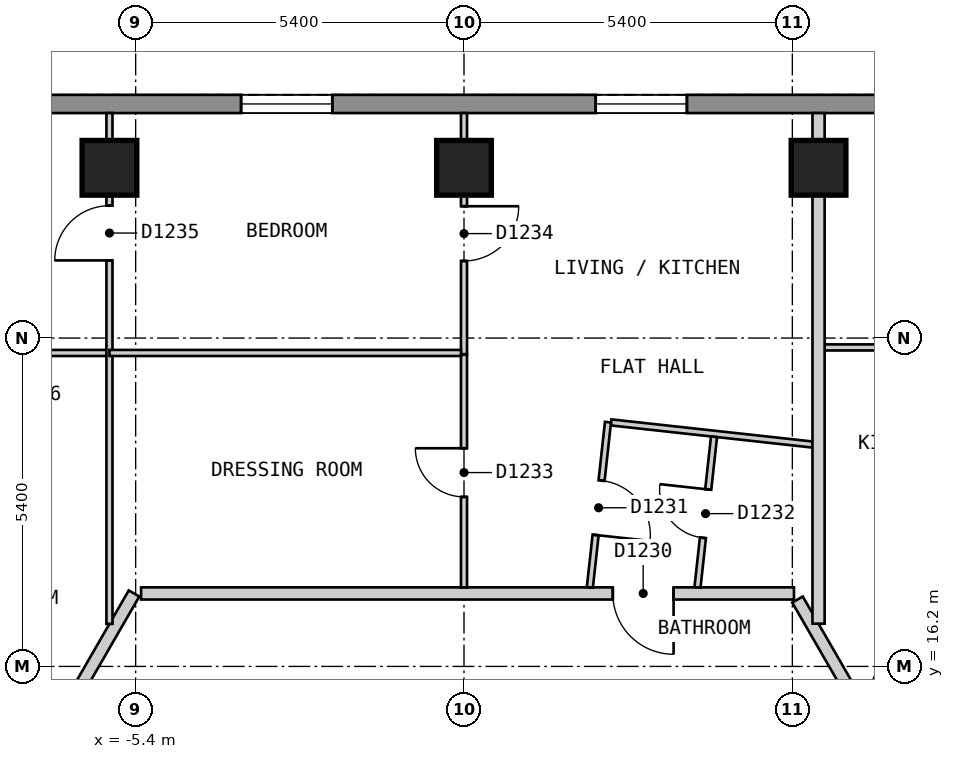
"""IFC4 building model, lengths in metres.
Left out: names, types, materials, properties, quantities, classifications, styles, units other than length and angle.
Written with IfcOpenShell. Run it as: python <this file> out.ifc"""

import sys

from ifc_helpers import new_model, si_unit, direction, frame, frame_2d, origin, origin_2d, place, context, subcontext, project, spatial, polyline, rectangle, outline, extrude, element, fill, save


model = new_model("IFC4")
c1 = context("Model", 3, precision=1e-05, world=origin(), true_north=direction((0.0, 1.0)))
c2 = subcontext(c1, "Body", "Model", "MODEL_VIEW")
j1 = project(units=[si_unit("LENGTHUNIT", "METRE"), si_unit("PLANEANGLEUNIT", "RADIAN")], contexts=[c1])
p1 = place(None, origin())
s1 = spatial("IfcSite", under=j1, at=p1, CompositionType="ELEMENT")
p2 = place(p1, origin())
s2 = spatial("IfcBuilding", under=s1, at=p2, CompositionType="ELEMENT")
p3 = place(p2, frame((0.0, 0.0, 117.6)))
s3 = spatial("IfcBuildingStorey", under=s2, at=p3, CompositionType="ELEMENT", Elevation=117.6)
for number, where, z_axis, x_axis in (
    (1, (5.831, 24.4, 0.0), (0.0, 0.0, 1.0), (-1.0, 0.0, 0.0)),
    (2, (0.0, 24.4, 0.0), (0.0, 0.0, 1.0), (-1.0, 0.0, 0.0)),
    (3, (-5.831, 24.4, 0.0), (0.0, 0.0, 1.0), (-1.0, 0.0, 0.0)),
):
    element("IfcColumn", number, at=place(p3, frame(where, z_axis=z_axis, x_axis=x_axis)), inside=s3, PredefinedType="COLUMN", context=c2, shape_type="SweptSolid", body=[
        extrude(rectangle(XDim=0.9, YDim=0.9, at=origin_2d()), origin(), (0.0, 0.0, 1.0), 3.0),
    ])
p4 = place(p3, frame((12.355, 25.45, 0.0), z_axis=(0.0, 0.0, 1.0), x_axis=(-1.0, 0.0, 0.0)))
e4 = element("IfcWall", 4, at=p4, inside=s3, PredefinedType="SOLIDWALL", context=c2, shape_type="SweptSolid", body=[
    extrude(outline(polyline([(0.0, -0.15), (24.71, -0.15), (24.63, 0.15), (0.08, 0.15), (0.0, -0.15)])), origin(), (0.0, 0.0, 1.0), 2.7),
])
p5 = place(p4, frame((2.858, 0.0, 0.15)))
e5 = element("IfcOpeningElement", 5, at=p5, cuts=e4, PredefinedType="OPENING", context=c2, shape_type="SweptSolid", body=[
    extrude(rectangle(XDim=1.5, YDim=2.1, at=frame_2d((0.75, 1.05))), frame((0.0, 0.16, 0.0), z_axis=(0.0, -1.0, 0.0), x_axis=(1.0, 0.0, 0.0)), (0.0, 0.0, 1.0), 0.32),
])
p6 = place(p4, frame((8.689, 0.0, 0.15)))
e6 = element("IfcOpeningElement", 6, at=p6, cuts=e4, PredefinedType="OPENING", context=c2, shape_type="SweptSolid", body=[
    extrude(rectangle(XDim=1.5, YDim=2.1, at=frame_2d((0.75, 1.05))), frame((0.0, 0.16, 0.0), z_axis=(0.0, -1.0, 0.0), x_axis=(1.0, 0.0, 0.0)), (0.0, 0.0, 1.0), 0.32),
])
p7 = place(p4, frame((14.521, 0.0, 0.15)))
e7 = element("IfcOpeningElement", 7, at=p7, cuts=e4, PredefinedType="OPENING", context=c2, shape_type="SweptSolid", body=[
    extrude(rectangle(XDim=1.5, YDim=2.1, at=frame_2d((0.75, 1.05))), frame((0.0, 0.16, 0.0), z_axis=(0.0, -1.0, 0.0), x_axis=(1.0, 0.0, 0.0)), (0.0, 0.0, 1.0), 0.32),
])
p8 = place(p4, frame((20.352, 0.0, 0.15)))
e8 = element("IfcOpeningElement", 8, at=p8, cuts=e4, PredefinedType="OPENING", context=c2, shape_type="SweptSolid", body=[
    extrude(rectangle(XDim=1.5, YDim=2.1, at=frame_2d((0.75, 1.05))), frame((0.0, 0.16, 0.0), z_axis=(0.0, -1.0, 0.0), x_axis=(1.0, 0.0, 0.0)), (0.0, 0.0, 1.0), 0.32),
])
p9 = place(p3, frame((5.485, 17.3, 0.0), z_axis=(0.0, 0.0, 1.0), x_axis=(0.500027479704, -0.866009537788, 0.0)))
e9 = element("IfcWall", 9, at=p9, inside=s3, PredefinedType="PARTITIONING", context=c2, shape_type="SweptSolid", body=[
    extrude(rectangle(XDim=2.309, YDim=0.2, at=frame_2d((1.155, 0.0))), origin(), (0.0, 0.0, 1.0), 2.7),
])
p10 = place(p3, frame((-5.311, 17.4, 0.0), z_axis=(0.0, 0.0, 1.0), x_axis=(1.0, 0.0, 0.0)))
e10 = element("IfcWall", 10, at=p10, inside=s3, PredefinedType="PARTITIONING", context=c2, shape_type="SweptSolid", body=[
    extrude(rectangle(XDim=10.738, YDim=0.2, at=frame_2d((5.369, 0.0))), origin(), (0.0, 0.0, 1.0), 2.7),
])
p11 = place(p10, frame((7.758, 0.0, 0.0)))
e11 = element("IfcOpeningElement", 11, at=p11, cuts=e10, PredefinedType="OPENING", context=c2, shape_type="SweptSolid", body=[
    extrude(rectangle(XDim=1.0, YDim=2.1, at=frame_2d((0.5, 1.05))), frame((0.0, 0.11, 0.0), z_axis=(0.0, -1.0, 0.0), x_axis=(1.0, 0.0, 0.0)), (0.0, 0.0, 1.0), 0.22),
])
p12 = place(p3, frame((-6.697, 15.2, 0.0), z_axis=(0.0, 0.0, 1.0), x_axis=(0.499963722229, 0.866046347752, 0.0)))
e12 = element("IfcWall", 12, at=p12, inside=s3, PredefinedType="PARTITIONING", context=c2, shape_type="SweptSolid", body=[
    extrude(rectangle(XDim=2.54, YDim=0.2, at=frame_2d((1.27, 0.0))), origin(), (0.0, 0.0, 1.0), 2.7),
])
p13 = place(p3, frame((2.419, 20.213, 0.0), z_axis=(0.0, 0.0, 1.0), x_axis=(0.994022340378, -0.109176860325, 0.0)))
e13 = element("IfcWall", 13, at=p13, inside=s3, PredefinedType="PARTITIONING", context=c2, shape_type="SweptSolid", body=[
    extrude(rectangle(XDim=3.332, YDim=0.1, at=frame_2d((1.666, 0.0))), origin(), (0.0, 0.0, 1.0), 2.7),
])
p14 = place(p3, frame((0.0, 21.325, 0.0), z_axis=(0.0, 0.0, 1.0), x_axis=(0.0, -1.0, 0.0)))
e14 = element("IfcWall", 14, at=p14, inside=s3, PredefinedType="PARTITIONING", context=c2, shape_type="SweptSolid", body=[
    extrude(rectangle(XDim=3.825, YDim=0.1, at=frame_2d((1.913, 0.0))), origin(), (0.0, 0.0, 1.0), 2.7),
])
p15 = place(p14, frame((1.537, 0.0, 0.0)))
e15 = element("IfcOpeningElement", 15, at=p15, cuts=e14, PredefinedType="OPENING", context=c2, shape_type="SweptSolid", body=[
    extrude(rectangle(XDim=0.8, YDim=2.1, at=frame_2d((0.4, 1.05))), frame((0.0, 0.06, 0.0), z_axis=(0.0, -1.0, 0.0), x_axis=(1.0, 0.0, 0.0)), (0.0, 0.0, 1.0), 0.12),
])
p16 = place(p3, frame((-7.652, 21.355, 0.0), z_axis=(0.0, 0.0, 1.0), x_axis=(1.0, 0.0, 0.0)))
e16 = element("IfcWall", 16, at=p16, inside=s3, PredefinedType="PARTITIONING", context=c2, shape_type="SweptSolid", body=[
    extrude(rectangle(XDim=1.821, YDim=0.1, at=frame_2d((0.911, 0.0))), origin(), (0.0, 0.0, 1.0), 2.7),
])
p17 = place(p3, frame((5.931, 21.446, 0.0), z_axis=(0.0, 0.0, 1.0), x_axis=(1.0, 0.0, 0.0)))
e17 = element("IfcWall", 17, at=p17, inside=s3, PredefinedType="PARTITIONING", context=c2, shape_type="SweptSolid", body=[
    extrude(rectangle(XDim=1.832, YDim=0.1, at=frame_2d((0.916, 0.0))), origin(), (0.0, 0.0, 1.0), 2.7),
])
p18 = place(p3, frame((6.6, 15.569, 0.0), z_axis=(0.0, 0.0, 1.0), x_axis=(0.415221636251, 0.909720282718, 0.0)))
e18 = element("IfcWall", 18, at=p18, inside=s3, PredefinedType="PARTITIONING", context=c2, shape_type="SweptSolid", body=[
    extrude(rectangle(XDim=4.783, YDim=0.1, at=frame_2d((2.391, 0.0))), origin(), (0.0, 0.0, 1.0), 2.7),
])
p19 = place(p18, frame((1.911, 0.0, 0.0)))
e19 = element("IfcOpeningElement", 19, at=p19, cuts=e18, PredefinedType="OPENING", context=c2, shape_type="SweptSolid", body=[
    extrude(rectangle(XDim=0.9, YDim=2.1, at=frame_2d((0.45, 1.05))), frame((0.0, 0.06, 0.0), z_axis=(0.0, -1.0, 0.0), x_axis=(1.0, 0.0, 0.0)), (0.0, 0.0, 1.0), 0.12),
])
p20 = place(p3, frame((2.07, 17.5, 0.0), z_axis=(0.0, 0.0, 1.0), x_axis=(0.108970694085, 0.994044962681, 0.0)))
e20 = element("IfcWall", 20, at=p20, inside=s3, PredefinedType="PARTITIONING", context=c2, shape_type="SweptSolid", body=[
    extrude(rectangle(XDim=2.733, YDim=0.1, at=frame_2d((1.367, 0.0))), origin(), (0.0, 0.0, 1.0), 2.7),
])
p21 = place(p20, frame((0.867, 0.0, 0.0)))
e21 = element("IfcOpeningElement", 21, at=p21, cuts=e20, PredefinedType="OPENING", context=c2, shape_type="SweptSolid", body=[
    extrude(rectangle(XDim=0.9, YDim=2.1, at=frame_2d((0.45, 1.05))), frame((0.0, 0.06, 0.0), z_axis=(0.0, -1.0, 0.0), x_axis=(1.0, 0.0, 0.0)), (0.0, 0.0, 1.0), 0.12),
])
p22 = place(p3, frame((3.84, 17.5, 0.0), z_axis=(0.0, 0.0, 1.0), x_axis=(0.109141067014, 0.994026271027, 0.0)))
e22 = element("IfcWall", 22, at=p22, inside=s3, PredefinedType="PARTITIONING", context=c2, shape_type="SweptSolid", body=[
    extrude(rectangle(XDim=2.492, YDim=0.1, at=frame_2d((1.246, 0.0))), origin(), (0.0, 0.0, 1.0), 2.7),
])
p23 = place(p22, frame((0.82, 0.0, 0.0)))
e23 = element("IfcOpeningElement", 23, at=p23, cuts=e22, PredefinedType="OPENING", context=c2, shape_type="SweptSolid", body=[
    extrude(rectangle(XDim=0.8, YDim=2.1, at=frame_2d((0.4, 1.05))), frame((0.0, 0.06, 0.0), z_axis=(0.0, -1.0, 0.0), x_axis=(1.0, 0.0, 0.0)), (0.0, 0.0, 1.0), 0.12),
])
p24 = place(p3, frame((0.0, 21.335, 0.0), z_axis=(0.0, 0.0, 1.0), x_axis=(0.0, 1.0, 0.0)))
e24 = element("IfcWall", 24, at=p24, inside=s3, PredefinedType="PARTITIONING", context=c2, shape_type="SweptSolid", body=[
    extrude(rectangle(XDim=3.965, YDim=0.1, at=frame_2d((1.982, 0.0))), origin(), (0.0, 0.0, 1.0), 2.7),
])
p25 = place(p24, frame((1.533, 0.0, 0.0)))
e25 = element("IfcOpeningElement", 25, at=p25, cuts=e24, PredefinedType="OPENING", context=c2, shape_type="SweptSolid", body=[
    extrude(rectangle(XDim=0.9, YDim=2.1, at=frame_2d((0.45, 1.05))), frame((0.0, 0.06, 0.0), z_axis=(0.0, -1.0, 0.0), x_axis=(1.0, 0.0, 0.0)), (0.0, 0.0, 1.0), 0.12),
])
p26 = place(p3, frame((-5.831, 16.9, 0.0), z_axis=(0.0, 0.0, 1.0), x_axis=(0.0, 1.0, 0.0)))
e26 = element("IfcWall", 26, at=p26, inside=s3, PredefinedType="PARTITIONING", context=c2, shape_type="SweptSolid", body=[
    extrude(rectangle(XDim=8.4, YDim=0.1, at=frame_2d((4.2, 0.0))), origin(), (0.0, 0.0, 1.0), 2.7),
])
p27 = place(p26, frame((5.977, 0.0, 0.0)))
e27 = element("IfcOpeningElement", 27, at=p27, cuts=e26, PredefinedType="OPENING", context=c2, shape_type="SweptSolid", body=[
    extrude(rectangle(XDim=0.9, YDim=2.1, at=frame_2d((0.45, 1.05))), frame((0.0, 0.06, 0.0), z_axis=(0.0, -1.0, 0.0), x_axis=(1.0, 0.0, 0.0)), (0.0, 0.0, 1.0), 0.12),
])
p28 = place(p3, frame((5.831, 16.903, 0.0), z_axis=(0.0, 0.0, 1.0), x_axis=(0.0, 1.0, 0.0)))
e28 = element("IfcWall", 28, at=p28, inside=s3, PredefinedType="PARTITIONING", context=c2, shape_type="SweptSolid", body=[
    extrude(rectangle(XDim=8.397, YDim=0.2, at=frame_2d((4.198, 0.0))), origin(), (0.0, 0.0, 1.0), 2.7),
])
p29 = place(p3, frame((-5.831, 21.355, 0.0), z_axis=(0.0, 0.0, 1.0), x_axis=(1.0, 0.0, 0.0)))
e29 = element("IfcWall", 29, at=p29, inside=s3, PredefinedType="PARTITIONING", context=c2, shape_type="SweptSolid", body=[
    extrude(rectangle(XDim=5.781, YDim=0.1, at=frame_2d((2.891, 0.0))), origin(), (0.0, 0.0, 1.0), 2.7),
])
p30 = place(p6, origin())
e30 = element("IfcWindow", 30, at=p30, inside=s3, PartitioningType="SINGLE_PANEL", PredefinedType="WINDOW", context=c2, shape_type="SweptSolid", body=[
    extrude(rectangle(XDim=1.5, YDim=2.1, at=frame_2d((0.75, 1.05))), frame((0.0, 0.03, 0.0), z_axis=(0.0, -1.0, 0.0), x_axis=(1.0, 0.0, 0.0)), (0.0, 0.0, 1.0), 0.06),
])
fill(e6, e30)
p31 = place(p7, origin())
e31 = element("IfcWindow", 31, at=p31, inside=s3, PartitioningType="SINGLE_PANEL", PredefinedType="WINDOW", context=c2, shape_type="SweptSolid", body=[
    extrude(rectangle(XDim=1.5, YDim=2.1, at=frame_2d((0.75, 1.05))), frame((0.0, 0.03, 0.0), z_axis=(0.0, -1.0, 0.0), x_axis=(1.0, 0.0, 0.0)), (0.0, 0.0, 1.0), 0.06),
])
fill(e7, e31)
p32 = place(p11, origin())
e32 = element("IfcDoor", 32, at=p32, inside=s3, OperationType="SINGLE_SWING_RIGHT", PredefinedType="DOOR", context=c2, shape_type="SweptSolid", body=[
    extrude(rectangle(XDim=1.0, YDim=2.1, at=frame_2d((0.5, 1.05))), frame((0.0, 0.025, 0.0), z_axis=(0.0, -1.0, 0.0), x_axis=(1.0, 0.0, 0.0)), (0.0, 0.0, 1.0), 0.05),
])
fill(e11, e32)
p33 = place(p21, origin())
e33 = element("IfcDoor", 33, at=p33, inside=s3, OperationType="SINGLE_SWING_LEFT", PredefinedType="DOOR", context=c2, shape_type="SweptSolid", body=[
    extrude(rectangle(XDim=0.9, YDim=2.1, at=frame_2d((0.45, 1.05))), frame((0.0, 0.025, 0.0), z_axis=(0.0, -1.0, 0.0), x_axis=(1.0, 0.0, 0.0)), (0.0, 0.0, 1.0), 0.05),
])
fill(e21, e33)
p34 = place(p23, origin())
e34 = element("IfcDoor", 34, at=p34, inside=s3, OperationType="SINGLE_SWING_RIGHT", PredefinedType="DOOR", context=c2, shape_type="SweptSolid", body=[
    extrude(rectangle(XDim=0.8, YDim=2.1, at=frame_2d((0.4, 1.05))), frame((0.0, 0.025, 0.0), z_axis=(0.0, -1.0, 0.0), x_axis=(1.0, 0.0, 0.0)), (0.0, 0.0, 1.0), 0.05),
])
fill(e23, e34)
p35 = place(p15, origin())
e35 = element("IfcDoor", 35, at=p35, inside=s3, OperationType="SINGLE_SWING_LEFT", PredefinedType="DOOR", context=c2, shape_type="SweptSolid", body=[
    extrude(rectangle(XDim=0.8, YDim=2.1, at=frame_2d((0.4, 1.05))), frame((0.0, 0.025, 0.0), z_axis=(0.0, -1.0, 0.0), x_axis=(1.0, 0.0, 0.0)), (0.0, 0.0, 1.0), 0.05),
])
fill(e15, e35)
p36 = place(p25, origin())
e36 = element("IfcDoor", 36, at=p36, inside=s3, OperationType="SINGLE_SWING_RIGHT", PredefinedType="DOOR", context=c2, shape_type="SweptSolid", body=[
    extrude(rectangle(XDim=0.9, YDim=2.1, at=frame_2d((0.45, 1.05))), frame((0.0, 0.025, 0.0), z_axis=(0.0, -1.0, 0.0), x_axis=(1.0, 0.0, 0.0)), (0.0, 0.0, 1.0), 0.05),
])
fill(e25, e36)
p37 = place(p27, origin())
e37 = element("IfcDoor", 37, at=p37, inside=s3, OperationType="SINGLE_SWING_LEFT", PredefinedType="DOOR", context=c2, shape_type="SweptSolid", body=[
    extrude(rectangle(XDim=0.9, YDim=2.1, at=frame_2d((0.45, 1.05))), frame((0.0, 0.025, 0.0), z_axis=(0.0, -1.0, 0.0), x_axis=(1.0, 0.0, 0.0)), (0.0, 0.0, 1.0), 0.05),
])
fill(e27, e37)
save(model, sys.argv[1])
